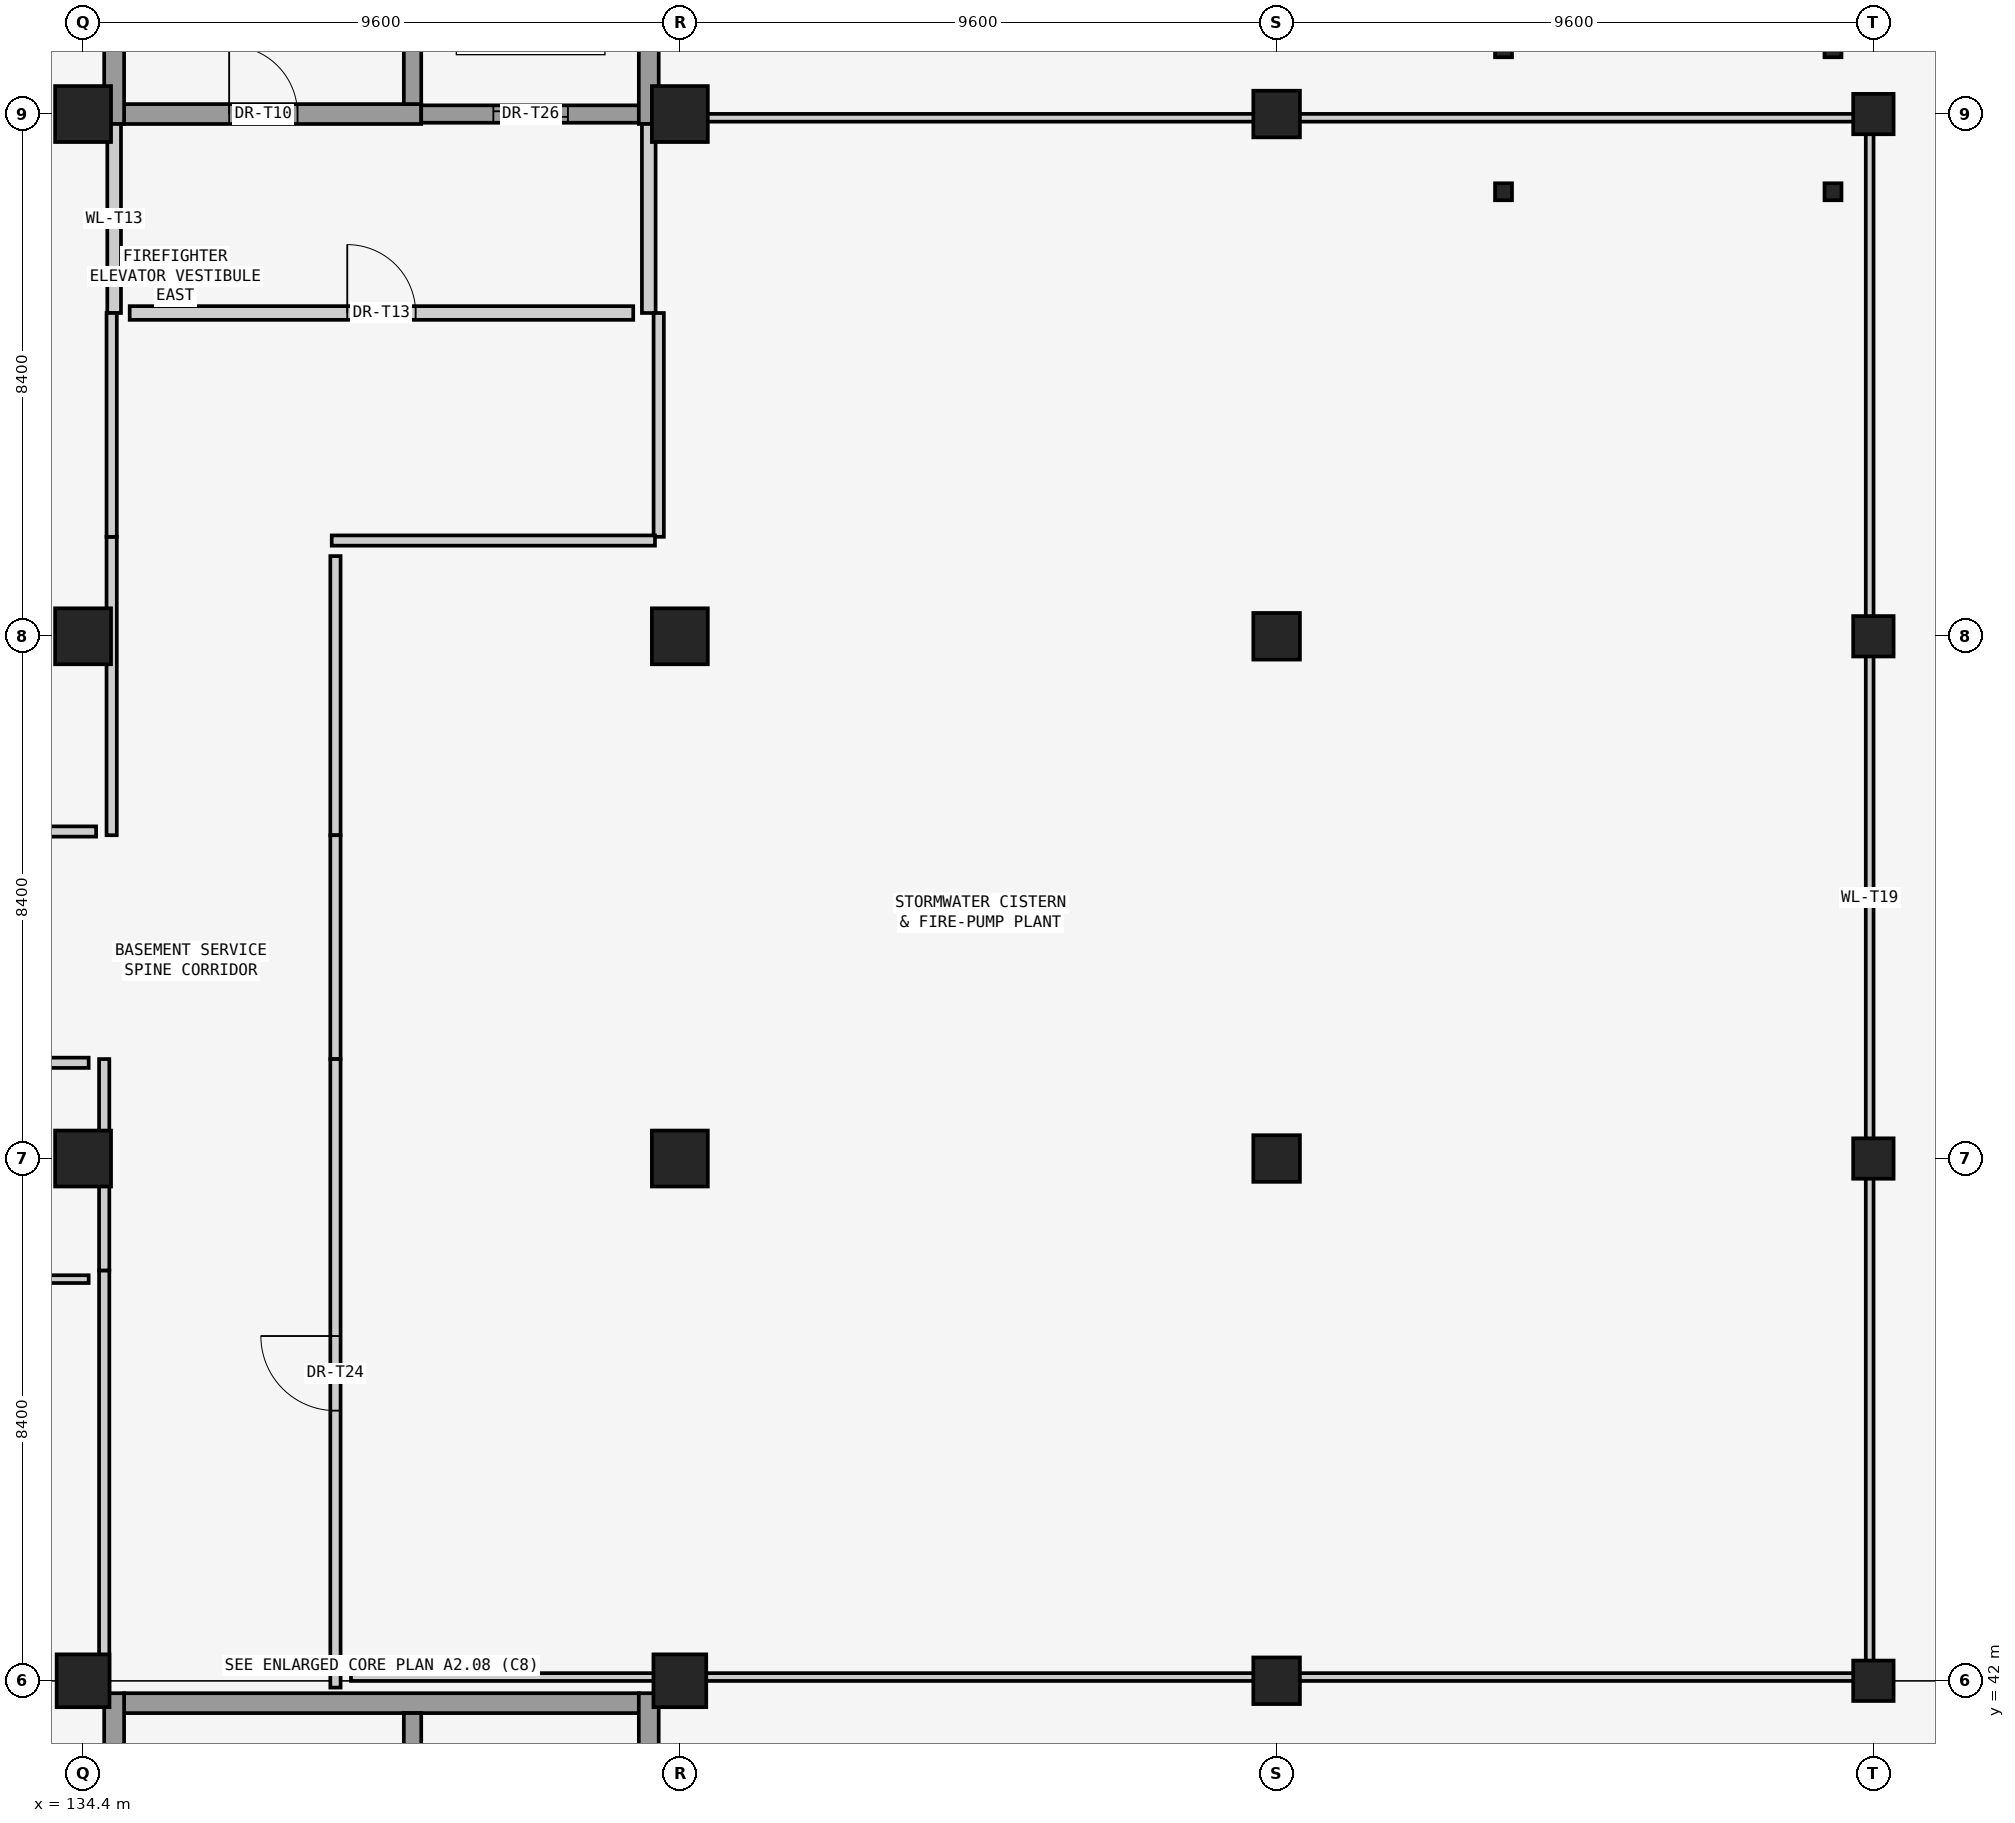
"""IFC4 building model, lengths in metres.
Left out: names, types, materials, properties, quantities, classifications, styles, units other than length and angle.
Written with IfcOpenShell. Run it as: python <this file> out.ifc"""

import sys

from ifc_helpers import new_model, si_unit, direction, frame, frame_2d, origin, origin_2d, place, context, subcontext, project, spatial, rectangle, hollow_circle, extrude, element, fill, save


model = new_model("IFC4")
c1 = context("Model", 3, precision=1e-05, world=origin(), true_north=direction((0.0, 1.0)))
c2 = subcontext(c1, "Body", "Model", "MODEL_VIEW")
j1 = project(units=[si_unit("LENGTHUNIT", "METRE"), si_unit("PLANEANGLEUNIT", "RADIAN")], contexts=[c1])
p1 = place(None, origin())
s1 = spatial("IfcSite", under=j1, at=p1, CompositionType="ELEMENT")
p2 = place(p1, origin())
s2 = spatial("IfcBuilding", under=s1, at=p2, CompositionType="ELEMENT")
p3 = place(p2, frame((0.0, 0.0, -9.6)))
s3 = spatial("IfcBuildingStorey", under=s2, at=p3, CompositionType="ELEMENT", Elevation=-9.6)
p4 = place(p3, frame((134.4, 42.0, 0.0), z_axis=(0.0, 0.0, 1.0), x_axis=(1.0, 0.0, 0.0)))
e1 = element("IfcColumn", 1, at=p4, inside=s3, PredefinedType="COLUMN", context=c2, shape_type="SweptSolid", body=[
    extrude(rectangle(XDim=0.85, YDim=0.85, at=origin_2d()), origin(), (0.0, 0.0, 1.0), 4.4),
])
for number, where, z_axis, x_axis in (
    (2, (134.4, 50.4, 0.0), (0.0, 0.0, 1.0), (1.0, 0.0, 0.0)),
    (3, (134.4, 58.8, 0.0), (0.0, 0.0, 1.0), (1.0, 0.0, 0.0)),
    (4, (134.4, 67.2, 0.0), (0.0, 0.0, 1.0), (1.0, 0.0, 0.0)),
):
    element("IfcColumn", number, at=place(p3, frame(where, z_axis=z_axis, x_axis=x_axis)), inside=s3, PredefinedType="COLUMN", context=c2, shape_type="SweptSolid", body=[
        extrude(rectangle(XDim=0.9, YDim=0.9, at=origin_2d()), origin(), (0.0, 0.0, 1.0), 4.4),
    ])
p5 = place(p3, frame((144.0, 42.0, 0.0), z_axis=(0.0, 0.0, 1.0), x_axis=(1.0, 0.0, 0.0)))
e5 = element("IfcColumn", 5, at=p5, inside=s3, PredefinedType="COLUMN", context=c2, shape_type="SweptSolid", body=[
    extrude(rectangle(XDim=0.85, YDim=0.85, at=origin_2d()), origin(), (0.0, 0.0, 1.0), 4.4),
])
for number, where, z_axis, x_axis in (
    (6, (144.0, 50.4, 0.0), (0.0, 0.0, 1.0), (1.0, 0.0, 0.0)),
    (7, (144.0, 58.8, 0.0), (0.0, 0.0, 1.0), (1.0, 0.0, 0.0)),
    (8, (144.0, 67.2, 0.0), (0.0, 0.0, 1.0), (1.0, 0.0, 0.0)),
):
    element("IfcColumn", number, at=place(p3, frame(where, z_axis=z_axis, x_axis=x_axis)), inside=s3, PredefinedType="COLUMN", context=c2, shape_type="SweptSolid", body=[
        extrude(rectangle(XDim=0.9, YDim=0.9, at=origin_2d()), origin(), (0.0, 0.0, 1.0), 4.4),
    ])
for number, where, z_axis, x_axis in (
    (9, (153.6, 42.0, 0.0), (0.0, 0.0, 1.0), (1.0, 0.0, 0.0)),
    (10, (153.6, 50.4, 0.0), (0.0, 0.0, 1.0), (1.0, 0.0, 0.0)),
    (11, (153.6, 58.8, 0.0), (0.0, 0.0, 1.0), (1.0, 0.0, 0.0)),
    (12, (153.6, 67.2, 0.0), (0.0, 0.0, 1.0), (1.0, 0.0, 0.0)),
):
    element("IfcColumn", number, at=place(p3, frame(where, z_axis=z_axis, x_axis=x_axis)), inside=s3, PredefinedType="COLUMN", context=c2, shape_type="SweptSolid", body=[
        extrude(rectangle(XDim=0.75, YDim=0.75, at=origin_2d()), origin(), (0.0, 0.0, 1.0), 4.4),
    ])
for number, where, z_axis, x_axis in (
    (13, (163.2, 42.0, 0.0), (0.0, 0.0, 1.0), (1.0, 0.0, 0.0)),
    (14, (163.2, 50.4, 0.0), (0.0, 0.0, 1.0), (1.0, 0.0, 0.0)),
    (15, (163.2, 58.8, 0.0), (0.0, 0.0, 1.0), (1.0, 0.0, 0.0)),
    (16, (163.2, 67.2, 0.0), (0.0, 0.0, 1.0), (1.0, 0.0, 0.0)),
):
    element("IfcColumn", number, at=place(p3, frame(where, z_axis=z_axis, x_axis=x_axis)), inside=s3, PredefinedType="COLUMN", context=c2, shape_type="SweptSolid", body=[
        extrude(rectangle(XDim=0.65, YDim=0.65, at=origin_2d()), origin(), (0.0, 0.0, 1.0), 4.4),
    ])
for number, where, z_axis, x_axis in (
    (17, (157.25, 65.95, 0.0), (0.0, 0.0, 1.0), (1.0, 0.0, 0.0)),
    (18, (157.25, 68.25, 0.0), (0.0, 0.0, 1.0), (1.0, 0.0, 0.0)),
    (19, (162.55, 65.95, 0.0), (0.0, 0.0, 1.0), (1.0, 0.0, 0.0)),
    (20, (162.55, 68.25, 0.0), (0.0, 0.0, 1.0), (1.0, 0.0, 0.0)),
):
    element("IfcColumn", number, at=place(p3, frame(where, z_axis=z_axis, x_axis=x_axis)), inside=s3, PredefinedType="COLUMN", context=c2, shape_type="SweptSolid", body=[
        extrude(hollow_circle(Radius=0.136, WallThickness=0.011, at=origin_2d()), origin(), (0.0, 0.0, 1.0), 4.4),
    ])
p6 = place(p3, frame((135.06, 67.2, 0.0), z_axis=(0.0, 0.0, 1.0), x_axis=(1.0, 0.0, 0.0)))
e21 = element("IfcWall", 21, at=p6, inside=s3, PredefinedType="SHEAR", context=c2, shape_type="SweptSolid", body=[
    extrude(rectangle(XDim=4.78, YDim=0.32, at=frame_2d((2.39, 0.0))), origin(), (0.0, 0.0, 1.0), 4.38),
])
p7 = place(p6, frame((1.69, 0.0, 0.0)))
e22 = element("IfcOpeningElement", 22, at=p7, cuts=e21, PredefinedType="OPENING", context=c2, shape_type="SweptSolid", body=[
    extrude(rectangle(XDim=1.1, YDim=2.2, at=frame_2d((0.55, 1.1))), frame((0.0, 0.17, 0.0), z_axis=(0.0, -1.0, 0.0), x_axis=(1.0, 0.0, 0.0)), (0.0, 0.0, 1.0), 0.34),
])
p8 = place(p3, frame((139.84, 67.2, 0.0), z_axis=(0.0, 0.0, 1.0), x_axis=(1.0, 0.0, 0.0)))
e23 = element("IfcWall", 23, at=p8, inside=s3, PredefinedType="SHEAR", context=c2, shape_type="SweptSolid", body=[
    extrude(rectangle(XDim=3.5, YDim=0.28, at=frame_2d((1.75, 0.0))), origin(), (0.0, 0.0, 1.0), 4.38),
])
p9 = place(p8, frame((1.16, 0.0, 0.0)))
e24 = element("IfcOpeningElement", 24, at=p9, cuts=e23, PredefinedType="OPENING", context=c2, shape_type="SweptSolid", body=[
    extrude(rectangle(XDim=1.2, YDim=2.2, at=frame_2d((0.6, 1.1))), frame((0.0, 0.15, 0.0), z_axis=(0.0, -1.0, 0.0), x_axis=(1.0, 0.0, 0.0)), (0.0, 0.0, 1.0), 0.3),
])
for number, where, z_axis, x_axis in (
    (25, (134.9, 75.4, 0.0), (0.0, 0.0, 1.0), (0.0, -1.0, 0.0)),
    (26, (143.5, 67.04, 0.0), (0.0, 0.0, 1.0), (0.0, 1.0, 0.0)),
):
    element("IfcWall", number, at=place(p3, frame(where, z_axis=z_axis, x_axis=x_axis)), inside=s3, PredefinedType="SHEAR", context=c2, shape_type="SweptSolid", body=[
        extrude(rectangle(XDim=8.36, YDim=0.32, at=frame_2d((4.18, 0.0))), origin(), (0.0, 0.0, 1.0), 4.38),
    ])
p10 = place(p3, frame((139.7, 67.36, 0.0), z_axis=(0.0, 0.0, 1.0), x_axis=(0.0, 1.0, 0.0)))
e27 = element("IfcWall", 27, at=p10, inside=s3, PredefinedType="SHEAR", context=c2, shape_type="SweptSolid", body=[
    extrude(rectangle(XDim=7.72, YDim=0.28, at=frame_2d((3.86, 0.0))), origin(), (0.0, 0.0, 1.0), 4.38),
])
p11 = place(p3, frame((143.34, 41.64, 0.0), z_axis=(0.0, 0.0, 1.0), x_axis=(-1.0, 0.0, 0.0)))
e28 = element("IfcWall", 28, at=p11, inside=s3, PredefinedType="SHEAR", context=c2, shape_type="SweptSolid", body=[
    extrude(rectangle(XDim=8.28, YDim=0.32, at=frame_2d((4.14, 0.0))), origin(), (0.0, 0.0, 1.0), 4.38),
])
for number, where, z_axis, x_axis in (
    (29, (134.9, 41.8, 0.0), (0.0, 0.0, 1.0), (0.0, -1.0, 0.0)),
    (30, (143.5, 33.44, 0.0), (0.0, 0.0, 1.0), (0.0, 1.0, 0.0)),
):
    element("IfcWall", number, at=place(p3, frame(where, z_axis=z_axis, x_axis=x_axis)), inside=s3, PredefinedType="SHEAR", context=c2, shape_type="SweptSolid", body=[
        extrude(rectangle(XDim=8.36, YDim=0.32, at=frame_2d((4.18, 0.0))), origin(), (0.0, 0.0, 1.0), 4.38),
    ])
p12 = place(p3, frame((139.7, 33.76, 0.0), z_axis=(0.0, 0.0, 1.0), x_axis=(0.0, 1.0, 0.0)))
e31 = element("IfcWall", 31, at=p12, inside=s3, PredefinedType="SHEAR", context=c2, shape_type="SweptSolid", body=[
    extrude(rectangle(XDim=7.72, YDim=0.28, at=frame_2d((3.86, 0.0))), origin(), (0.0, 0.0, 1.0), 4.38),
])
for number, where, z_axis, x_axis in (
    (32, (134.9, 64.0, 0.0), (0.0, 0.0, 1.0), (0.0, 1.0, 0.0)),
    (33, (143.5, 64.0, 0.0), (0.0, 0.0, 1.0), (0.0, 1.0, 0.0)),
):
    element("IfcWall", number, at=place(p3, frame(where, z_axis=z_axis, x_axis=x_axis)), inside=s3, PredefinedType="SOLIDWALL", context=c2, shape_type="SweptSolid", body=[
        extrude(rectangle(XDim=3.04, YDim=0.22, at=frame_2d((1.52, 0.0))), origin(), (0.0, 0.0, 1.0), 4.32),
    ])
p13 = place(p3, frame((135.15, 64.0, 0.0), z_axis=(0.0, 0.0, 1.0), x_axis=(1.0, 0.0, 0.0)))
e34 = element("IfcWall", 34, at=p13, inside=s3, PredefinedType="SOLIDWALL", context=c2, shape_type="SweptSolid", body=[
    extrude(rectangle(XDim=8.1, YDim=0.22, at=frame_2d((4.05, 0.0))), origin(), (0.0, 0.0, 1.0), 4.32),
])
p14 = place(p13, frame((3.5, 0.0, 0.0)))
e35 = element("IfcOpeningElement", 35, at=p14, cuts=e34, PredefinedType="OPENING", context=c2, shape_type="SweptSolid", body=[
    extrude(rectangle(XDim=1.1, YDim=2.2, at=frame_2d((0.55, 1.1))), frame((0.0, 0.12, 0.0), z_axis=(0.0, -1.0, 0.0), x_axis=(1.0, 0.0, 0.0)), (0.0, 0.0, 1.0), 0.24),
])
p15 = place(p3, frame((143.66, 60.4, 0.0), z_axis=(0.0, 0.0, 1.0), x_axis=(0.0, 1.0, 0.0)))
e36 = element("IfcWall", 36, at=p15, inside=s3, PredefinedType="PARTITIONING", context=c2, shape_type="SweptSolid", body=[
    extrude(rectangle(XDim=3.6, YDim=0.165, at=frame_2d((1.8, 0.0))), origin(), (0.0, 0.0, 1.0), 4.35),
])
p16 = place(p3, frame((138.4, 60.34, 0.0), z_axis=(0.0, 0.0, 1.0), x_axis=(1.0, 0.0, 0.0)))
e37 = element("IfcWall", 37, at=p16, inside=s3, PredefinedType="PARTITIONING", context=c2, shape_type="SweptSolid", body=[
    extrude(rectangle(XDim=5.2, YDim=0.165, at=frame_2d((2.6, 0.0))), origin(), (0.0, 0.0, 1.0), 4.35),
])
p17 = place(p3, frame((138.46, 55.6, 0.0), z_axis=(0.0, 0.0, 1.0), x_axis=(0.0, 1.0, 0.0)))
e38 = element("IfcWall", 38, at=p17, inside=s3, PredefinedType="PARTITIONING", context=c2, shape_type="SweptSolid", body=[
    extrude(rectangle(XDim=4.49, YDim=0.165, at=frame_2d((2.245, 0.0))), origin(), (0.0, 0.0, 1.0), 4.35),
])
p18 = place(p3, frame((138.46, 52.0, 0.0), z_axis=(0.0, 0.0, 1.0), x_axis=(0.0, 1.0, 0.0)))
e39 = element("IfcWall", 39, at=p18, inside=s3, PredefinedType="PARTITIONING", context=c2, shape_type="SweptSolid", body=[
    extrude(rectangle(XDim=3.6, YDim=0.165, at=frame_2d((1.8, 0.0))), origin(), (0.0, 0.0, 1.0), 4.35),
])
p19 = place(p3, frame((138.46, 41.89, 0.0), z_axis=(0.0, 0.0, 1.0), x_axis=(0.0, 1.0, 0.0)))
e40 = element("IfcWall", 40, at=p19, inside=s3, PredefinedType="PARTITIONING", context=c2, shape_type="SweptSolid", body=[
    extrude(rectangle(XDim=10.11, YDim=0.165, at=frame_2d((5.055, 0.0))), origin(), (0.0, 0.0, 1.0), 4.35),
])
p20 = place(p19, frame((4.455, 0.0, 0.0)))
e41 = element("IfcOpeningElement", 41, at=p20, cuts=e40, PredefinedType="OPENING", context=c2, shape_type="SweptSolid", body=[
    extrude(rectangle(XDim=1.2, YDim=2.2, at=frame_2d((0.6, 1.1))), frame((0.0, 0.093, 0.0), z_axis=(0.0, -1.0, 0.0), x_axis=(1.0, 0.0, 0.0)), (0.0, 0.0, 1.0), 0.185),
])
p21 = place(p3, frame((134.74, 41.8, 0.0), z_axis=(0.0, 0.0, 1.0), x_axis=(0.0, 1.0, 0.0)))
e42 = element("IfcWall", 42, at=p21, inside=s3, PredefinedType="PARTITIONING", context=c2, shape_type="SweptSolid", body=[
    extrude(rectangle(XDim=6.8, YDim=0.165, at=frame_2d((3.4, 0.0))), origin(), (0.0, 0.0, 1.0), 4.35),
])
p22 = place(p3, frame((134.86, 55.6, 0.0), z_axis=(0.0, 0.0, 1.0), x_axis=(0.0, 1.0, 0.0)))
e43 = element("IfcWall", 43, at=p22, inside=s3, PredefinedType="PARTITIONING", context=c2, shape_type="SweptSolid", body=[
    extrude(rectangle(XDim=4.8, YDim=0.165, at=frame_2d((2.4, 0.0))), origin(), (0.0, 0.0, 1.0), 4.35),
])
p23 = place(p3, frame((134.86, 60.4, 0.0), z_axis=(0.0, 0.0, 1.0), x_axis=(0.0, 1.0, 0.0)))
e44 = element("IfcWall", 44, at=p23, inside=s3, PredefinedType="PARTITIONING", context=c2, shape_type="SweptSolid", body=[
    extrude(rectangle(XDim=3.6, YDim=0.165, at=frame_2d((1.8, 0.0))), origin(), (0.0, 0.0, 1.0), 4.35),
])
p24 = place(p3, frame((123.6, 55.66, 0.0), z_axis=(0.0, 0.0, 1.0), x_axis=(1.0, 0.0, 0.0)))
e45 = element("IfcWall", 45, at=p24, inside=s3, PredefinedType="PARTITIONING", context=c2, shape_type="SweptSolid", body=[
    extrude(rectangle(XDim=11.01, YDim=0.165, at=frame_2d((5.505, 0.0))), origin(), (0.0, 0.0, 1.0), 4.35),
])
p25 = place(p24, frame((4.905, 0.0, 0.0)))
e46 = element("IfcOpeningElement", 46, at=p25, cuts=e45, PredefinedType="OPENING", context=c2, shape_type="SweptSolid", body=[
    extrude(rectangle(XDim=1.2, YDim=2.2, at=frame_2d((0.6, 1.1))), frame((0.0, 0.093, 0.0), z_axis=(0.0, -1.0, 0.0), x_axis=(1.0, 0.0, 0.0)), (0.0, 0.0, 1.0), 0.185),
])
p26 = place(p3, frame((134.74, 48.6, 0.0), z_axis=(0.0, 0.0, 1.0), x_axis=(0.0, 1.0, 0.0)))
e47 = element("IfcWall", 47, at=p26, inside=s3, PredefinedType="PARTITIONING", context=c2, shape_type="SweptSolid", body=[
    extrude(rectangle(XDim=3.4, YDim=0.165, at=frame_2d((1.7, 0.0))), origin(), (0.0, 0.0, 1.0), 4.35),
])
p27 = place(p3, frame((123.6, 51.94, 0.0), z_axis=(0.0, 0.0, 1.0), x_axis=(1.0, 0.0, 0.0)))
e48 = element("IfcWall", 48, at=p27, inside=s3, PredefinedType="PARTITIONING", context=c2, shape_type="SweptSolid", body=[
    extrude(rectangle(XDim=10.89, YDim=0.165, at=frame_2d((5.445, 0.0))), origin(), (0.0, 0.0, 1.0), 4.35),
])
p28 = place(p3, frame((163.14, 42.0, 0.0), z_axis=(0.0, 0.0, 1.0), x_axis=(0.0, 1.0, 0.0)))
e49 = element("IfcWall", 49, at=p28, inside=s3, PredefinedType="PARTITIONING", context=c2, shape_type="SweptSolid", body=[
    extrude(rectangle(XDim=25.2, YDim=0.125, at=frame_2d((12.6, 0.0))), origin(), (0.0, 0.0, 1.0), 3.58),
])
p29 = place(p3, frame((138.71, 42.06, 0.0), z_axis=(0.0, 0.0, 1.0), x_axis=(1.0, 0.0, 0.0)))
e50 = element("IfcWall", 50, at=p29, inside=s3, PredefinedType="PARTITIONING", context=c2, shape_type="SweptSolid", body=[
    extrude(rectangle(XDim=24.18, YDim=0.125, at=frame_2d((12.09, 0.0))), origin(), (0.0, 0.0, 1.0), 3.38),
])
p30 = place(p3, frame((143.75, 67.14, 0.0), z_axis=(0.0, 0.0, 1.0), x_axis=(1.0, 0.0, 0.0)))
e51 = element("IfcWall", 51, at=p30, inside=s3, PredefinedType="PARTITIONING", context=c2, shape_type="SweptSolid", body=[
    extrude(rectangle(XDim=19.14, YDim=0.125, at=frame_2d((9.57, 0.0))), origin(), (0.0, 0.0, 1.0), 3.28),
])
p31 = place(p3, frame((74.46, 48.46, 0.0), z_axis=(0.0, 0.0, 1.0), x_axis=(1.0, 0.0, 0.0)))
e52 = element("IfcWall", 52, at=p31, inside=s3, PredefinedType="PARTITIONING", context=c2, shape_type="SweptSolid", body=[
    extrude(rectangle(XDim=60.03, YDim=0.125, at=frame_2d((30.015, 0.0))), origin(), (0.0, 0.0, 1.0), 4.35),
])
p32 = place(p7, origin())
e53 = element("IfcDoor", 53, at=p32, inside=s3, OperationType="SINGLE_SWING_LEFT", PredefinedType="DOOR", context=c2, shape_type="SweptSolid", body=[
    extrude(rectangle(XDim=1.1, YDim=2.2, at=frame_2d((0.55, 1.1))), frame((0.0, 0.025, 0.0), z_axis=(0.0, -1.0, 0.0), x_axis=(1.0, 0.0, 0.0)), (0.0, 0.0, 1.0), 0.05),
])
fill(e22, e53)
p33 = place(p9, origin())
e54 = element("IfcDoor", 54, at=p33, inside=s3, OperationType="SLIDING_TO_RIGHT", PredefinedType="DOOR", context=c2, shape_type="SweptSolid", body=[
    extrude(rectangle(XDim=1.2, YDim=2.2, at=frame_2d((0.6, 1.1))), frame((0.0, 0.025, 0.0), z_axis=(0.0, -1.0, 0.0), x_axis=(1.0, 0.0, 0.0)), (0.0, 0.0, 1.0), 0.05),
])
fill(e24, e54)
p34 = place(p14, origin())
e55 = element("IfcDoor", 55, at=p34, inside=s3, OperationType="SINGLE_SWING_LEFT", PredefinedType="DOOR", context=c2, shape_type="SweptSolid", body=[
    extrude(rectangle(XDim=1.1, YDim=2.2, at=frame_2d((0.55, 1.1))), frame((0.0, 0.025, 0.0), z_axis=(0.0, -1.0, 0.0), x_axis=(1.0, 0.0, 0.0)), (0.0, 0.0, 1.0), 0.05),
])
fill(e35, e55)
p35 = place(p20, origin())
e56 = element("IfcDoor", 56, at=p35, inside=s3, OperationType="SINGLE_SWING_RIGHT", PredefinedType="DOOR", context=c2, shape_type="SweptSolid", body=[
    extrude(rectangle(XDim=1.2, YDim=2.2, at=frame_2d((0.6, 1.1))), frame((0.0, 0.025, 0.0), z_axis=(0.0, -1.0, 0.0), x_axis=(1.0, 0.0, 0.0)), (0.0, 0.0, 1.0), 0.05),
])
fill(e41, e56)
save(model, sys.argv[1])
